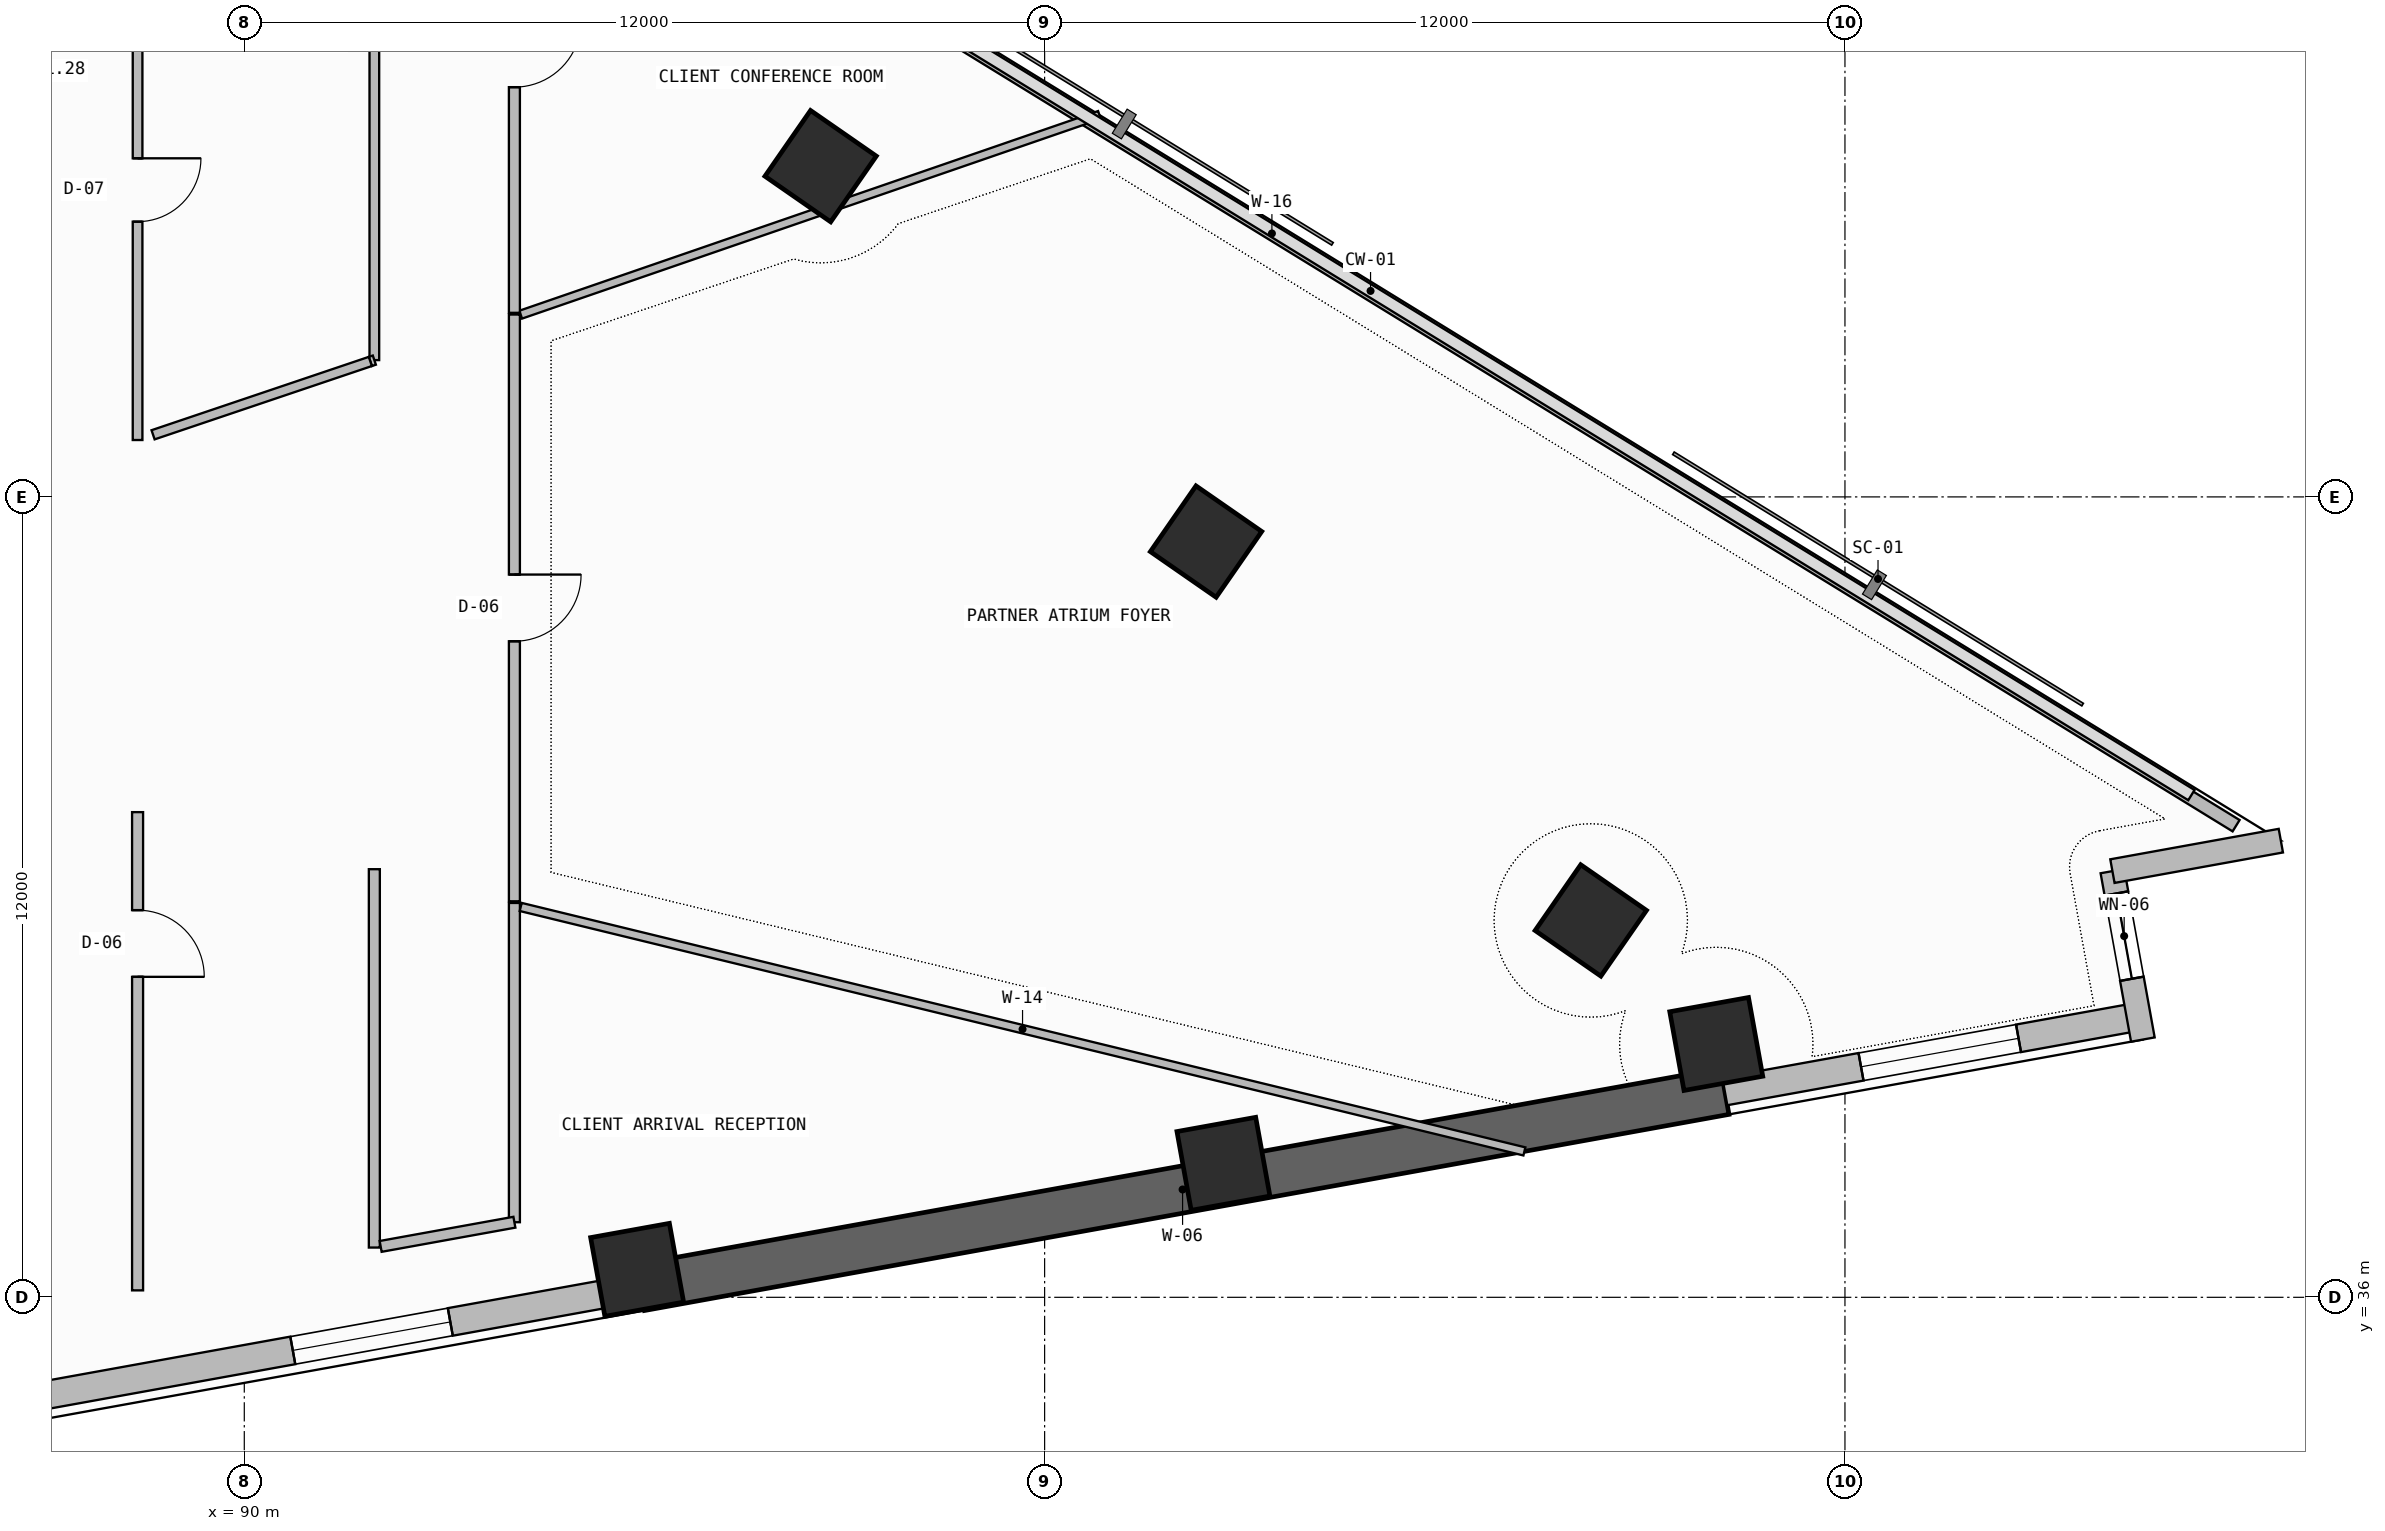
"""IFC4 building model, lengths in metres.
Left out: names, types, materials, properties, quantities, classifications, styles, units other than length and angle.
Written with IfcOpenShell. Run it as: python <this file> out.ifc"""

import sys

from ifc_helpers import new_model, si_unit, direction, frame, frame_2d, origin, origin_2d, place, context, subcontext, project, spatial, rectangle, extrude, element, fill, save


model = new_model("IFC4")
c1 = context("Model", 3, precision=1e-05, world=origin(), true_north=direction((0.0, 1.0)))
c2 = subcontext(c1, "Body", "Model", "MODEL_VIEW")
j1 = project(units=[si_unit("LENGTHUNIT", "METRE"), si_unit("PLANEANGLEUNIT", "RADIAN")], contexts=[c1])
p1 = place(None, origin())
s1 = spatial("IfcSite", under=j1, at=p1, CompositionType="ELEMENT")
p2 = place(p1, origin())
s2 = spatial("IfcBuilding", under=s1, at=p2, CompositionType="ELEMENT")
p3 = place(p2, frame((0.0, 0.0, 99.3)))
s3 = spatial("IfcBuildingStorey", under=s2, at=p3, CompositionType="ELEMENT", Elevation=99.3)
for number, where, z_axis, x_axis in (
    (1, (95.89, 36.412, 0.0), (0.0, 0.0, 1.0), (0.984, 0.178, 0.0)),
    (2, (104.681, 38.001, 0.0), (0.0, 0.0, 1.0), (0.984, 0.178, 0.0)),
    (3, (112.07, 39.798, 0.0), (0.0, 0.0, 1.0), (0.984, 0.178, 0.0)),
    (4, (110.189, 41.65, 0.0), (0.0, 0.0, 1.0), (0.57, 0.822, 0.0)),
    (5, (104.42, 47.331, 0.0), (0.0, 0.0, 1.0), (0.57, 0.822, 0.0)),
    (6, (98.641, 52.958, 0.0), (0.0, 0.0, 1.0), (0.57, 0.822, 0.0)),
):
    element("IfcColumn", number, at=place(p3, frame(where, z_axis=z_axis, x_axis=x_axis)), inside=s3, PredefinedType="COLUMN", context=c2, shape_type="SweptSolid", body=[
        extrude(rectangle(XDim=1.2, YDim=1.2, at=origin_2d()), origin(), (0.0, 0.0, 1.0), 3.6),
    ])
p4 = place(p3, frame((86.1, 34.367, 0.0), z_axis=(0.0, 0.0, 1.0), x_axis=(0.9840437071, 0.177926902172, 0.0)))
e7 = element("IfcWall", 7, at=p4, inside=s3, PredefinedType="SOLIDWALL", context=c2, shape_type="SweptSolid", body=[
    extrude(rectangle(XDim=9.997, YDim=0.42, at=frame_2d((4.999, 0.0))), origin(), (0.0, 0.0, 1.0), 2.325),
])
p5 = place(p4, frame((4.702, 0.0, 1.2)))
e8 = element("IfcOpeningElement", 8, at=p5, cuts=e7, PredefinedType="OPENING", context=c2, shape_type="SweptSolid", body=[
    extrude(rectangle(XDim=2.4, YDim=0.9, at=frame_2d((1.2, 0.45))), frame((0.0, 0.22, 0.0), z_axis=(0.0, -1.0, 0.0), x_axis=(1.0, 0.0, 0.0)), (0.0, 0.0, 1.0), 0.44),
])
p6 = place(p3, frame((95.938, 36.146, -0.26), z_axis=(0.0, 0.0, 1.0), x_axis=(0.984038488288, 0.177955762952, 0.0)))
e9 = element("IfcWall", 9, at=p6, inside=s3, PredefinedType="SHEAR", context=c2, shape_type="SweptSolid", body=[
    extrude(rectangle(XDim=16.525, YDim=0.7, at=frame_2d((8.262, 0.0))), origin(), (0.0, 0.0, 1.0), 3.6),
])
p7 = place(p3, frame((112.199, 39.087, 0.0), z_axis=(0.0, 0.0, 1.0), x_axis=(0.984042888215, 0.177931431042, 0.0)))
e10 = element("IfcWall", 10, at=p7, inside=s3, PredefinedType="SOLIDWALL", context=c2, shape_type="SweptSolid", body=[
    extrude(rectangle(XDim=6.306, YDim=0.42, at=frame_2d((3.153, 0.0))), origin(), (0.0, 0.0, 1.0), 3.34),
])
p8 = place(p7, frame((2.075, 0.0, 1.2)))
e11 = element("IfcOpeningElement", 11, at=p8, cuts=e10, PredefinedType="OPENING", context=c2, shape_type="SweptSolid", body=[
    extrude(rectangle(XDim=2.4, YDim=0.9, at=frame_2d((1.2, 0.45))), frame((0.0, 0.22, 0.0), z_axis=(0.0, -1.0, 0.0), x_axis=(1.0, 0.0, 0.0)), (0.0, 0.0, 1.0), 0.44),
])
p9 = place(p3, frame((118.467, 39.864, 0.0), z_axis=(0.0, 0.0, 1.0), x_axis=(-0.177897493713, 0.984049024048, 0.0)))
e12 = element("IfcWall", 12, at=p9, inside=s3, PredefinedType="SOLIDWALL", context=c2, shape_type="SweptSolid", body=[
    extrude(rectangle(XDim=2.566, YDim=0.36, at=frame_2d((1.283, 0.0))), origin(), (0.0, 0.0, 1.0), 3.34),
])
p10 = place(p9, frame((0.926, 0.0, 0.45)))
e13 = element("IfcOpeningElement", 13, at=p10, cuts=e12, PredefinedType="OPENING", context=c2, shape_type="SweptSolid", body=[
    extrude(rectangle(XDim=1.3, YDim=2.4, at=frame_2d((0.65, 1.2))), frame((0.0, 0.19, 0.0), z_axis=(0.0, -1.0, 0.0), x_axis=(1.0, 0.0, 0.0)), (0.0, 0.0, 1.0), 0.38),
])
p11 = place(p3, frame((118.01, 42.39, 0.0), z_axis=(0.0, 0.0, 1.0), x_axis=(0.984046012923, 0.177914149102, 0.0)))
e14 = element("IfcWall", 14, at=p11, inside=s3, PredefinedType="SOLIDWALL", context=c2, shape_type="SweptSolid", body=[
    extrude(rectangle(XDim=2.566, YDim=0.36, at=frame_2d((1.283, 0.0))), origin(), (0.0, 0.0, 1.0), 3.34),
])
p12 = place(p3, frame((119.865, 43.07, 0.0), z_axis=(0.0, 0.0, 1.0), x_axis=(-0.852110824326, 0.52336138859, 0.0)))
e15 = element("IfcWall", 15, at=p12, inside=s3, PredefinedType="PARAPET", context=c2, shape_type="SweptSolid", body=[
    extrude(rectangle(XDim=33.932, YDim=0.2, at=frame_2d((16.966, 0.0))), origin(), (0.0, 0.0, 1.0), 1.15),
])
p13 = place(p3, frame((88.4, 36.104, 0.0), z_axis=(0.0, 0.0, 1.0), x_axis=(0.0, 1.0, 0.0)))
e16 = element("IfcWall", 16, at=p13, inside=s3, PredefinedType="PARTITIONING", context=c2, shape_type="SweptSolid", body=[
    extrude(rectangle(XDim=7.17, YDim=0.165, at=frame_2d((3.585, 0.0))), origin(), (0.0, 0.0, 1.0), 2.725),
])
p14 = place(p13, frame((4.7, 0.0, 0.0)))
e17 = element("IfcOpeningElement", 17, at=p14, cuts=e16, PredefinedType="OPENING", context=c2, shape_type="SweptSolid", body=[
    extrude(rectangle(XDim=1.0, YDim=2.2, at=frame_2d((0.5, 1.1))), frame((0.0, 0.093, 0.0), z_axis=(0.0, -1.0, 0.0), x_axis=(1.0, 0.0, 0.0)), (0.0, 0.0, 1.0), 0.185),
])
p15 = place(p3, frame((91.95, 42.418, 0.0), z_axis=(0.0, 0.0, 1.0), x_axis=(0.0, -1.0, 0.0)))
e18 = element("IfcWall", 18, at=p15, inside=s3, PredefinedType="PARTITIONING", context=c2, shape_type="SweptSolid", body=[
    extrude(rectangle(XDim=5.672, YDim=0.165, at=frame_2d((2.836, 0.0))), origin(), (0.0, 0.0, 1.0), 2.725),
])
p16 = place(p3, frame((94.05, 37.126, 0.0), z_axis=(0.0, 0.0, 1.0), x_axis=(0.0, 1.0, 0.0)))
e19 = element("IfcWall", 19, at=p16, inside=s3, PredefinedType="PARTITIONING", context=c2, shape_type="SweptSolid", body=[
    extrude(rectangle(XDim=4.787, YDim=0.165, at=frame_2d((2.393, 0.0))), origin(), (0.0, 0.0, 1.0), 2.875),
])
p17 = place(p3, frame((92.044, 36.763, 0.0), z_axis=(0.0, 0.0, 1.0), x_axis=(0.984051476933, 0.177883924923, 0.0)))
e20 = element("IfcWall", 20, at=p17, inside=s3, PredefinedType="PARTITIONING", context=c2, shape_type="SweptSolid", body=[
    extrude(rectangle(XDim=2.038, YDim=0.165, at=frame_2d((1.019, 0.0))), origin(), (0.0, 0.0, 1.0), 3.34),
])
p18 = place(p3, frame((94.145, 41.852, 0.0), z_axis=(0.0, 0.0, 1.0), x_axis=(0.971605150491, -0.236608181471, 0.0)))
e21 = element("IfcWall", 21, at=p18, inside=s3, PredefinedType="PARTITIONING", context=c2, shape_type="SweptSolid", body=[
    extrude(rectangle(XDim=15.489, YDim=0.125, at=frame_2d((7.744, 0.0))), origin(), (0.0, 0.0, 1.0), 2.325),
])
p19 = place(p3, frame((94.05, 41.937, 0.0), z_axis=(0.0, 0.0, 1.0), x_axis=(0.0, 1.0, 0.0)))
e22 = element("IfcWall", 22, at=p19, inside=s3, PredefinedType="PARTITIONING", context=c2, shape_type="SweptSolid", body=[
    extrude(rectangle(XDim=8.797, YDim=0.165, at=frame_2d((4.399, 0.0))), origin(), (0.0, 0.0, 1.0), 2.725),
])
p20 = place(p19, frame((3.899, 0.0, 0.0)))
e23 = element("IfcOpeningElement", 23, at=p20, cuts=e22, PredefinedType="OPENING", context=c2, shape_type="SweptSolid", body=[
    extrude(rectangle(XDim=1.0, YDim=2.2, at=frame_2d((0.5, 1.1))), frame((0.0, 0.093, 0.0), z_axis=(0.0, -1.0, 0.0), x_axis=(1.0, 0.0, 0.0)), (0.0, 0.0, 1.0), 0.185),
])
p21 = place(p3, frame((94.145, 50.732, 0.0), z_axis=(0.0, 0.0, 1.0), x_axis=(0.945341886098, 0.326080846399, 0.0)))
e24 = element("IfcWall", 24, at=p21, inside=s3, PredefinedType="PARTITIONING", context=c2, shape_type="SweptSolid", body=[
    extrude(rectangle(XDim=9.179, YDim=0.125, at=frame_2d((4.59, 0.0))), origin(), (0.0, 0.0, 1.0), 2.725),
])
p22 = place(p3, frame((88.4, 48.853, 0.0), z_axis=(0.0, 0.0, 1.0), x_axis=(0.0, 1.0, 0.0)))
e25 = element("IfcWall", 25, at=p22, inside=s3, PredefinedType="PARTITIONING", context=c2, shape_type="SweptSolid", body=[
    extrude(rectangle(XDim=7.497, YDim=0.145, at=frame_2d((3.749, 0.0))), origin(), (0.0, 0.0, 1.0), 2.725),
])
p23 = place(p22, frame((3.274, 0.0, 0.0)))
e26 = element("IfcOpeningElement", 26, at=p23, cuts=e25, PredefinedType="OPENING", context=c2, shape_type="SweptSolid", body=[
    extrude(rectangle(XDim=0.95, YDim=2.15, at=frame_2d((0.475, 1.075))), frame((0.0, 0.083, 0.0), z_axis=(0.0, -1.0, 0.0), x_axis=(1.0, 0.0, 0.0)), (0.0, 0.0, 1.0), 0.165),
])
p24 = place(p3, frame((91.95, 56.35, 0.0), z_axis=(0.0, 0.0, 1.0), x_axis=(0.0, -1.0, 0.0)))
e27 = element("IfcWall", 27, at=p24, inside=s3, PredefinedType="PARTITIONING", context=c2, shape_type="SweptSolid", body=[
    extrude(rectangle(XDim=6.299, YDim=0.145, at=frame_2d((3.15, 0.0))), origin(), (0.0, 0.0, 1.0), 2.725),
])
p25 = place(p3, frame((91.95, 50.051, 0.0), z_axis=(0.0, 0.0, 1.0), x_axis=(-0.948683298051, -0.316227766017, 0.0)))
e28 = element("IfcWall", 28, at=p25, inside=s3, PredefinedType="PARTITIONING", context=c2, shape_type="SweptSolid", body=[
    extrude(rectangle(XDim=0.063, YDim=0.145, at=frame_2d((0.032, 0.0))), origin(), (0.0, 0.0, 1.0), 3.34),
])
p26 = place(p3, frame((94.05, 50.76, 0.0), z_axis=(0.0, 0.0, 1.0), x_axis=(0.0, 1.0, 0.0)))
e29 = element("IfcWall", 29, at=p26, inside=s3, PredefinedType="PARTITIONING", context=c2, shape_type="SweptSolid", body=[
    extrude(rectangle(XDim=7.767, YDim=0.165, at=frame_2d((3.883, 0.0))), origin(), (0.0, 0.0, 1.0), 2.725),
])
p27 = place(p26, frame((3.383, 0.0, 0.0)))
e30 = element("IfcOpeningElement", 30, at=p27, cuts=e29, PredefinedType="OPENING", context=c2, shape_type="SweptSolid", body=[
    extrude(rectangle(XDim=1.0, YDim=2.2, at=frame_2d((0.5, 1.1))), frame((0.0, 0.093, 0.0), z_axis=(0.0, -1.0, 0.0), x_axis=(1.0, 0.0, 0.0)), (0.0, 0.0, 1.0), 0.185),
])
p28 = place(p3, frame((91.89, 50.031, 0.0), z_axis=(0.0, 0.0, 1.0), x_axis=(-0.947469146396, -0.319847176988, 0.0)))
e31 = element("IfcWall", 31, at=p28, inside=s3, PredefinedType="PARTITIONING", context=c2, shape_type="SweptSolid", body=[
    extrude(rectangle(XDim=3.438, YDim=0.145, at=frame_2d((1.719, 0.0))), origin(), (0.0, 0.0, 1.0), 3.34),
])
p29 = place(p5, origin())
e32 = element("IfcWindow", 32, at=p29, inside=s3, PartitioningType="SINGLE_PANEL", PredefinedType="WINDOW", context=c2, shape_type="SweptSolid", body=[
    extrude(rectangle(XDim=2.4, YDim=0.9, at=frame_2d((1.2, 0.45))), frame((0.0, 0.03, 0.0), z_axis=(0.0, -1.0, 0.0), x_axis=(1.0, 0.0, 0.0)), (0.0, 0.0, 1.0), 0.06),
])
fill(e8, e32)
p30 = place(p8, origin())
e33 = element("IfcWindow", 33, at=p30, inside=s3, PartitioningType="SINGLE_PANEL", PredefinedType="WINDOW", context=c2, shape_type="SweptSolid", body=[
    extrude(rectangle(XDim=2.4, YDim=0.9, at=frame_2d((1.2, 0.45))), frame((0.0, 0.03, 0.0), z_axis=(0.0, -1.0, 0.0), x_axis=(1.0, 0.0, 0.0)), (0.0, 0.0, 1.0), 0.06),
])
fill(e11, e33)
p31 = place(p10, origin())
e34 = element("IfcWindow", 34, at=p31, inside=s3, PartitioningType="SINGLE_PANEL", PredefinedType="WINDOW", context=c2, shape_type="SweptSolid", body=[
    extrude(rectangle(XDim=1.3, YDim=2.4, at=frame_2d((0.65, 1.2))), frame((0.0, 0.03, 0.0), z_axis=(0.0, -1.0, 0.0), x_axis=(1.0, 0.0, 0.0)), (0.0, 0.0, 1.0), 0.06),
])
fill(e13, e34)
p32 = place(p14, frame((1.0, 0.0, 0.0), z_axis=(0.0, 0.0, 1.0), x_axis=(-1.0, 0.0, 0.0)))
e35 = element("IfcDoor", 35, at=p32, inside=s3, OperationType="SINGLE_SWING_RIGHT", PredefinedType="DOOR", context=c2, shape_type="SweptSolid", body=[
    extrude(rectangle(XDim=1.0, YDim=2.2, at=frame_2d((0.5, 1.1))), frame((0.0, 0.025, 0.0), z_axis=(0.0, -1.0, 0.0), x_axis=(1.0, 0.0, 0.0)), (0.0, 0.0, 1.0), 0.05),
])
fill(e17, e35)
p33 = place(p20, frame((1.0, 0.0, 0.0), z_axis=(0.0, 0.0, 1.0), x_axis=(-1.0, 0.0, 0.0)))
e36 = element("IfcDoor", 36, at=p33, inside=s3, OperationType="SINGLE_SWING_LEFT", PredefinedType="DOOR", context=c2, shape_type="SweptSolid", body=[
    extrude(rectangle(XDim=1.0, YDim=2.2, at=frame_2d((0.5, 1.1))), frame((0.0, 0.025, 0.0), z_axis=(0.0, -1.0, 0.0), x_axis=(1.0, 0.0, 0.0)), (0.0, 0.0, 1.0), 0.05),
])
fill(e23, e36)
p34 = place(p23, frame((0.95, 0.0, 0.0), z_axis=(0.0, 0.0, 1.0), x_axis=(-1.0, 0.0, 0.0)))
e37 = element("IfcDoor", 37, at=p34, inside=s3, OperationType="SINGLE_SWING_LEFT", PredefinedType="DOOR", context=c2, shape_type="SweptSolid", body=[
    extrude(rectangle(XDim=0.95, YDim=2.15, at=frame_2d((0.475, 1.075))), frame((0.0, 0.025, 0.0), z_axis=(0.0, -1.0, 0.0), x_axis=(1.0, 0.0, 0.0)), (0.0, 0.0, 1.0), 0.05),
])
fill(e26, e37)
p35 = place(p27, frame((1.0, 0.0, 0.0), z_axis=(0.0, 0.0, 1.0), x_axis=(-1.0, 0.0, 0.0)))
e38 = element("IfcDoor", 38, at=p35, inside=s3, OperationType="SINGLE_SWING_LEFT", PredefinedType="DOOR", context=c2, shape_type="SweptSolid", body=[
    extrude(rectangle(XDim=1.0, YDim=2.2, at=frame_2d((0.5, 1.1))), frame((0.0, 0.025, 0.0), z_axis=(0.0, -1.0, 0.0), x_axis=(1.0, 0.0, 0.0)), (0.0, 0.0, 1.0), 0.05),
])
fill(e30, e38)
save(model, sys.argv[1])
